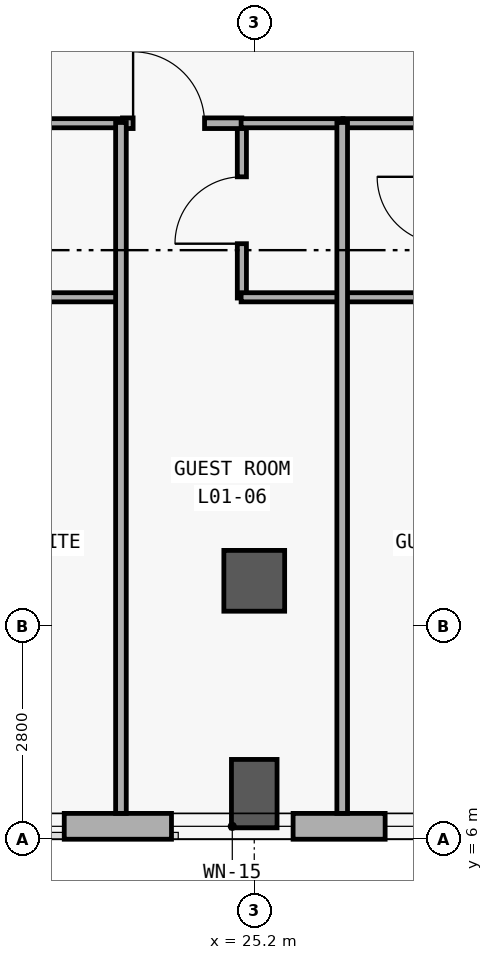
"""IFC4 building model, lengths in metres.
Left out: names, types, materials, properties, quantities, classifications, styles, units other than length and angle.
Written with IfcOpenShell. Run it as: python <this file> out.ifc"""

import sys

from ifc_helpers import new_model, si_unit, direction, frame, frame_2d, origin, origin_2d, place, context, subcontext, project, spatial, rectangle, extrude, element, fill, save


model = new_model("IFC4")
c1 = context("Model", 3, precision=1e-05, world=origin(), true_north=direction((0.0, 1.0)))
c2 = subcontext(c1, "Body", "Model", "MODEL_VIEW")
j1 = project(units=[si_unit("LENGTHUNIT", "METRE"), si_unit("PLANEANGLEUNIT", "RADIAN")], contexts=[c1])
p1 = place(None, origin())
s1 = spatial("IfcSite", under=j1, at=p1, CompositionType="ELEMENT")
p2 = place(p1, origin())
s2 = spatial("IfcBuilding", under=s1, at=p2, CompositionType="ELEMENT")
p3 = place(p2, frame((0.0, 0.0, 5.4)))
s3 = spatial("IfcBuildingStorey", under=s2, at=p3, CompositionType="ELEMENT", Elevation=5.4)
p4 = place(p3, frame((25.2, 6.6, 0.0), z_axis=(0.0, 0.0, 1.0), x_axis=(0.0, 1.0, 0.0)))
e1 = element("IfcColumn", 1, at=p4, inside=s3, PredefinedType="COLUMN", context=c2, shape_type="SweptSolid", body=[
    extrude(rectangle(XDim=0.6, YDim=0.9, at=origin_2d()), origin(), (0.0, 0.0, 1.0), 5.4),
])
p5 = place(p3, frame((25.2, 9.4, 0.0), z_axis=(0.0, 0.0, 1.0), x_axis=(1.0, 0.0, 0.0)))
e2 = element("IfcColumn", 2, at=p5, inside=s3, PredefinedType="COLUMN", context=c2, shape_type="SweptSolid", body=[
    extrude(rectangle(XDim=0.8, YDim=0.8, at=origin_2d()), origin(), (0.0, 0.0, 1.0), 5.4),
])
p6 = place(p3, frame((92.06, 6.17, 0.0), z_axis=(0.0, 0.0, 1.0), x_axis=(-1.0, 0.0, 0.0)))
e3 = element("IfcWall", 3, at=p6, inside=s3, PredefinedType="SOLIDWALL", context=c2, shape_type="SweptSolid", body=[
    extrude(rectangle(XDim=83.32, YDim=0.34, at=frame_2d((41.66, 0.0))), origin(), (0.0, 0.0, 1.0), 5.1),
])
p7 = place(p6, frame((80.804, 0.0, 0.85)))
e4 = element("IfcOpeningElement", 4, at=p7, cuts=e3, PredefinedType="OPENING", context=c2, shape_type="SweptSolid", body=[
    extrude(rectangle(XDim=1.8, YDim=1.8, at=frame_2d((0.9, 0.9))), frame((0.0, 0.18, 0.0), z_axis=(0.0, -1.0, 0.0), x_axis=(1.0, 0.0, 0.0)), (0.0, 0.0, 1.0), 0.36),
])
p8 = place(p6, frame((78.043, 0.0, 0.85)))
e5 = element("IfcOpeningElement", 5, at=p8, cuts=e3, PredefinedType="OPENING", context=c2, shape_type="SweptSolid", body=[
    extrude(rectangle(XDim=1.5, YDim=1.75, at=frame_2d((0.75, 0.875))), frame((0.0, 0.18, 0.0), z_axis=(0.0, -1.0, 0.0), x_axis=(1.0, 0.0, 0.0)), (0.0, 0.0, 1.0), 0.36),
])
p9 = place(p6, frame((75.057, 0.0, 0.85)))
e6 = element("IfcOpeningElement", 6, at=p9, cuts=e3, PredefinedType="OPENING", context=c2, shape_type="SweptSolid", body=[
    extrude(rectangle(XDim=1.65, YDim=1.75, at=frame_2d((0.825, 0.875))), frame((0.0, 0.18, 0.0), z_axis=(0.0, -1.0, 0.0), x_axis=(1.0, 0.0, 0.0)), (0.0, 0.0, 1.0), 0.36),
])
p10 = place(p6, frame((71.997, 0.0, 0.85)))
e7 = element("IfcOpeningElement", 7, at=p10, cuts=e3, PredefinedType="OPENING", context=c2, shape_type="SweptSolid", body=[
    extrude(rectangle(XDim=1.95, YDim=1.75, at=frame_2d((0.975, 0.875))), frame((0.0, 0.18, 0.0), z_axis=(0.0, -1.0, 0.0), x_axis=(1.0, 0.0, 0.0)), (0.0, 0.0, 1.0), 0.36),
])
p11 = place(p6, frame((69.36, 0.0, 0.85)))
e8 = element("IfcOpeningElement", 8, at=p11, cuts=e3, PredefinedType="OPENING", context=c2, shape_type="SweptSolid", body=[
    extrude(rectangle(XDim=1.4, YDim=1.6, at=frame_2d((0.7, 0.8))), frame((0.0, 0.18, 0.0), z_axis=(0.0, -1.0, 0.0), x_axis=(1.0, 0.0, 0.0)), (0.0, 0.0, 1.0), 0.36),
])
p12 = place(p6, frame((66.349, 0.0, 0.85)))
e9 = element("IfcOpeningElement", 9, at=p12, cuts=e3, PredefinedType="OPENING", context=c2, shape_type="SweptSolid", body=[
    extrude(rectangle(XDim=1.6, YDim=1.6, at=frame_2d((0.8, 0.8))), frame((0.0, 0.18, 0.0), z_axis=(0.0, -1.0, 0.0), x_axis=(1.0, 0.0, 0.0)), (0.0, 0.0, 1.0), 0.36),
])
p13 = place(p6, frame((63.338, 0.0, 0.85)))
e10 = element("IfcOpeningElement", 10, at=p13, cuts=e3, PredefinedType="OPENING", context=c2, shape_type="SweptSolid", body=[
    extrude(rectangle(XDim=1.8, YDim=1.6, at=frame_2d((0.9, 0.8))), frame((0.0, 0.18, 0.0), z_axis=(0.0, -1.0, 0.0), x_axis=(1.0, 0.0, 0.0)), (0.0, 0.0, 1.0), 0.36),
])
p14 = place(p6, frame((60.327, 0.0, 0.85)))
e11 = element("IfcOpeningElement", 11, at=p14, cuts=e3, PredefinedType="OPENING", context=c2, shape_type="SweptSolid", body=[
    extrude(rectangle(XDim=2.0, YDim=1.65, at=frame_2d((1.0, 0.825))), frame((0.0, 0.18, 0.0), z_axis=(0.0, -1.0, 0.0), x_axis=(1.0, 0.0, 0.0)), (0.0, 0.0, 1.0), 0.36),
])
p15 = place(p6, frame((57.791, 0.0, 0.85)))
e12 = element("IfcOpeningElement", 12, at=p15, cuts=e3, PredefinedType="OPENING", context=c2, shape_type="SweptSolid", body=[
    extrude(rectangle(XDim=1.25, YDim=1.45, at=frame_2d((0.625, 0.725))), frame((0.0, 0.18, 0.0), z_axis=(0.0, -1.0, 0.0), x_axis=(1.0, 0.0, 0.0)), (0.0, 0.0, 1.0), 0.36),
])
p16 = place(p6, frame((38.744, 0.0, 0.85)))
e13 = element("IfcOpeningElement", 13, at=p16, cuts=e3, PredefinedType="OPENING", context=c2, shape_type="SweptSolid", body=[
    extrude(rectangle(XDim=3.3, YDim=2.15, at=frame_2d((1.65, 1.075))), frame((0.0, 0.18, 0.0), z_axis=(0.0, -1.0, 0.0), x_axis=(1.0, 0.0, 0.0)), (0.0, 0.0, 1.0), 0.36),
])
p17 = place(p6, frame((35.07, 0.0, 0.85)))
e14 = element("IfcOpeningElement", 14, at=p17, cuts=e3, PredefinedType="OPENING", context=c2, shape_type="SweptSolid", body=[
    extrude(rectangle(XDim=1.18, YDim=1.5, at=frame_2d((0.59, 0.75))), frame((0.0, 0.18, 0.0), z_axis=(0.0, -1.0, 0.0), x_axis=(1.0, 0.0, 0.0)), (0.0, 0.0, 1.0), 0.36),
])
p18 = place(p6, frame((30.287, 0.0, 0.85)))
e15 = element("IfcOpeningElement", 15, at=p18, cuts=e3, PredefinedType="OPENING", context=c2, shape_type="SweptSolid", body=[
    extrude(rectangle(XDim=1.28, YDim=1.6, at=frame_2d((0.64, 0.8))), frame((0.0, 0.18, 0.0), z_axis=(0.0, -1.0, 0.0), x_axis=(1.0, 0.0, 0.0)), (0.0, 0.0, 1.0), 0.36),
])
p19 = place(p6, frame((25.503, 0.0, 0.85)))
e16 = element("IfcOpeningElement", 16, at=p19, cuts=e3, PredefinedType="OPENING", context=c2, shape_type="SweptSolid", body=[
    extrude(rectangle(XDim=1.38, YDim=1.7, at=frame_2d((0.69, 0.85))), frame((0.0, 0.18, 0.0), z_axis=(0.0, -1.0, 0.0), x_axis=(1.0, 0.0, 0.0)), (0.0, 0.0, 1.0), 0.36),
])
p20 = place(p6, frame((20.72, 0.0, 0.85)))
e17 = element("IfcOpeningElement", 17, at=p20, cuts=e3, PredefinedType="OPENING", context=c2, shape_type="SweptSolid", body=[
    extrude(rectangle(XDim=1.48, YDim=1.8, at=frame_2d((0.74, 0.9))), frame((0.0, 0.18, 0.0), z_axis=(0.0, -1.0, 0.0), x_axis=(1.0, 0.0, 0.0)), (0.0, 0.0, 1.0), 0.36),
])
p21 = place(p6, frame((15.937, 0.0, 0.85)))
e18 = element("IfcOpeningElement", 18, at=p21, cuts=e3, PredefinedType="OPENING", context=c2, shape_type="SweptSolid", body=[
    extrude(rectangle(XDim=1.58, YDim=1.85, at=frame_2d((0.79, 0.925))), frame((0.0, 0.18, 0.0), z_axis=(0.0, -1.0, 0.0), x_axis=(1.0, 0.0, 0.0)), (0.0, 0.0, 1.0), 0.36),
])
p22 = place(p6, frame((11.154, 0.0, 0.85)))
e19 = element("IfcOpeningElement", 19, at=p22, cuts=e3, PredefinedType="OPENING", context=c2, shape_type="SweptSolid", body=[
    extrude(rectangle(XDim=1.68, YDim=1.9, at=frame_2d((0.84, 0.95))), frame((0.0, 0.18, 0.0), z_axis=(0.0, -1.0, 0.0), x_axis=(1.0, 0.0, 0.0)), (0.0, 0.0, 1.0), 0.36),
])
p23 = place(p6, frame((6.37, 0.0, 0.85)))
e20 = element("IfcOpeningElement", 20, at=p23, cuts=e3, PredefinedType="OPENING", context=c2, shape_type="SweptSolid", body=[
    extrude(rectangle(XDim=1.78, YDim=1.95, at=frame_2d((0.89, 0.975))), frame((0.0, 0.18, 0.0), z_axis=(0.0, -1.0, 0.0), x_axis=(1.0, 0.0, 0.0)), (0.0, 0.0, 1.0), 0.36),
])
p24 = place(p6, frame((1.586, 0.0, 0.85)))
e21 = element("IfcOpeningElement", 21, at=p24, cuts=e3, PredefinedType="OPENING", context=c2, shape_type="SweptSolid", body=[
    extrude(rectangle(XDim=1.88, YDim=1.95, at=frame_2d((0.94, 0.975))), frame((0.0, 0.18, 0.0), z_axis=(0.0, -1.0, 0.0), x_axis=(1.0, 0.0, 0.0)), (0.0, 0.0, 1.0), 0.36),
])
p25 = place(p3, frame((25.037, 13.12, 0.0), z_axis=(0.0, 0.0, 1.0), x_axis=(0.0, 1.0, 0.0)))
e22 = element("IfcWall", 22, at=p25, inside=s3, PredefinedType="PARTITIONING", context=c2, shape_type="SweptSolid", body=[
    extrude(rectangle(XDim=2.31, YDim=0.12, at=frame_2d((1.155, 0.0))), origin(), (0.0, 0.0, 1.0), 4.18),
])
p26 = place(p25, frame((0.715, 0.0, 0.0)))
e23 = element("IfcOpeningElement", 23, at=p26, cuts=e22, PredefinedType="OPENING", context=c2, shape_type="SweptSolid", body=[
    extrude(rectangle(XDim=0.88, YDim=2.15, at=frame_2d((0.44, 1.075))), frame((0.0, 0.07, 0.0), z_axis=(0.0, -1.0, 0.0), x_axis=(1.0, 0.0, 0.0)), (0.0, 0.0, 1.0), 0.14),
])
p27 = place(p3, frame((23.466, 15.42, 0.0), z_axis=(0.0, 0.0, 1.0), x_axis=(1.0, 0.0, 0.0)))
e24 = element("IfcWall", 24, at=p27, inside=s3, PredefinedType="PARTITIONING", context=c2, shape_type="SweptSolid", body=[
    extrude(rectangle(XDim=1.571, YDim=0.14, at=frame_2d((0.786, 0.0))), origin(), (0.0, 0.0, 1.0), 4.18),
])
p28 = place(p27, frame((0.14, 0.0, 0.0)))
e25 = element("IfcOpeningElement", 25, at=p28, cuts=e24, PredefinedType="OPENING", context=c2, shape_type="SweptSolid", body=[
    extrude(rectangle(XDim=0.94, YDim=2.2, at=frame_2d((0.47, 1.1))), frame((0.0, 0.08, 0.0), z_axis=(0.0, -1.0, 0.0), x_axis=(1.0, 0.0, 0.0)), (0.0, 0.0, 1.0), 0.16),
])
for number, where, z_axis, x_axis in (
    (26, (22.116, 13.13, 0.0), (0.0, 0.0, 1.0), (1.0, 0.0, 0.0)),
    (27, (22.116, 15.42, 0.0), (0.0, 0.0, 1.0), (1.0, 0.0, 0.0)),
):
    element("IfcWall", number, at=place(p3, frame(where, z_axis=z_axis, x_axis=x_axis)), inside=s3, PredefinedType="PARTITIONING", context=c2, shape_type="SweptSolid", body=[
        extrude(rectangle(XDim=1.34, YDim=0.12, at=frame_2d((0.67, 0.0))), origin(), (0.0, 0.0, 1.0), 4.18),
    ])
for number, where, z_axis, x_axis in (
    (28, (25.027, 13.13, 0.0), (0.0, 0.0, 1.0), (1.0, 0.0, 0.0)),
    (29, (25.027, 15.42, 0.0), (0.0, 0.0, 1.0), (1.0, 0.0, 0.0)),
):
    element("IfcWall", number, at=place(p3, frame(where, z_axis=z_axis, x_axis=x_axis)), inside=s3, PredefinedType="PARTITIONING", context=c2, shape_type="SweptSolid", body=[
        extrude(rectangle(XDim=1.34, YDim=0.12, at=frame_2d((0.67, 0.0))), origin(), (0.0, 0.0, 1.0), 4.18),
    ])
for number, where, z_axis, x_axis in (
    (30, (26.367, 13.13, 0.0), (0.0, 0.0, 1.0), (1.0, 0.0, 0.0)),
    (31, (26.367, 15.42, 0.0), (0.0, 0.0, 1.0), (1.0, 0.0, 0.0)),
):
    element("IfcWall", number, at=place(p3, frame(where, z_axis=z_axis, x_axis=x_axis)), inside=s3, PredefinedType="PARTITIONING", context=c2, shape_type="SweptSolid", body=[
        extrude(rectangle(XDim=1.34, YDim=0.12, at=frame_2d((0.67, 0.0))), origin(), (0.0, 0.0, 1.0), 4.18),
    ])
for number, where, z_axis, x_axis in (
    (32, (23.446, 6.34, 0.0), (0.0, 0.0, 1.0), (0.0, 1.0, 0.0)),
    (33, (26.357, 6.34, 0.0), (0.0, 0.0, 1.0), (0.0, 1.0, 0.0)),
):
    element("IfcWall", number, at=place(p3, frame(where, z_axis=z_axis, x_axis=x_axis)), inside=s3, PredefinedType="PARTITIONING", context=c2, shape_type="SweptSolid", body=[
        extrude(rectangle(XDim=9.09, YDim=0.14, at=frame_2d((4.545, 0.0))), origin(), (0.0, 0.0, 1.0), 4.18),
    ])
p29 = place(p11, origin())
e34 = element("IfcWindow", 34, at=p29, inside=s3, PartitioningType="SINGLE_PANEL", PredefinedType="WINDOW", context=c2, shape_type="SweptSolid", body=[
    extrude(rectangle(XDim=1.4, YDim=1.6, at=frame_2d((0.7, 0.8))), frame((0.0, 0.03, 0.0), z_axis=(0.0, -1.0, 0.0), x_axis=(1.0, 0.0, 0.0)), (0.0, 0.0, 1.0), 0.06),
])
fill(e8, e34)
p30 = place(p12, origin())
e35 = element("IfcWindow", 35, at=p30, inside=s3, PartitioningType="SINGLE_PANEL", PredefinedType="WINDOW", context=c2, shape_type="SweptSolid", body=[
    extrude(rectangle(XDim=1.6, YDim=1.6, at=frame_2d((0.8, 0.8))), frame((0.0, 0.03, 0.0), z_axis=(0.0, -1.0, 0.0), x_axis=(1.0, 0.0, 0.0)), (0.0, 0.0, 1.0), 0.06),
])
fill(e9, e35)
p31 = place(p13, origin())
e36 = element("IfcWindow", 36, at=p31, inside=s3, PartitioningType="SINGLE_PANEL", PredefinedType="WINDOW", context=c2, shape_type="SweptSolid", body=[
    extrude(rectangle(XDim=1.8, YDim=1.6, at=frame_2d((0.9, 0.8))), frame((0.0, 0.03, 0.0), z_axis=(0.0, -1.0, 0.0), x_axis=(1.0, 0.0, 0.0)), (0.0, 0.0, 1.0), 0.06),
])
fill(e10, e36)
p32 = place(p26, origin())
e37 = element("IfcDoor", 37, at=p32, inside=s3, OperationType="SINGLE_SWING_LEFT", PredefinedType="DOOR", context=c2, shape_type="SweptSolid", body=[
    extrude(rectangle(XDim=0.88, YDim=2.15, at=frame_2d((0.44, 1.075))), frame((0.0, 0.025, 0.0), z_axis=(0.0, -1.0, 0.0), x_axis=(1.0, 0.0, 0.0)), (0.0, 0.0, 1.0), 0.05),
])
fill(e23, e37)
p33 = place(p28, origin())
e38 = element("IfcDoor", 38, at=p33, inside=s3, OperationType="SINGLE_SWING_LEFT", PredefinedType="DOOR", context=c2, shape_type="SweptSolid", body=[
    extrude(rectangle(XDim=0.94, YDim=2.2, at=frame_2d((0.47, 1.1))), frame((0.0, 0.025, 0.0), z_axis=(0.0, -1.0, 0.0), x_axis=(1.0, 0.0, 0.0)), (0.0, 0.0, 1.0), 0.05),
])
fill(e25, e38)
save(model, sys.argv[1])
